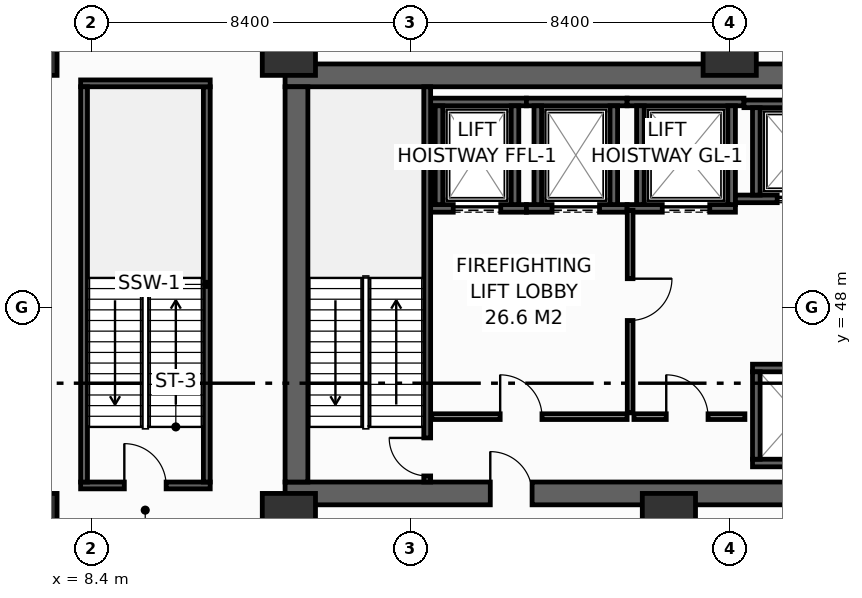
"""IFC4 building model, lengths in metres.
Left out: names, types, materials, properties, quantities, classifications, styles, units other than length and angle.
Written with IfcOpenShell. Run it as: python <this file> out.ifc"""

import sys

from ifc_helpers import new_model, si_unit, direction, frame, frame_2d, origin, origin_2d, place, context, subcontext, project, spatial, rectangle, hollow_rectangle, extrude, element, fill, save


model = new_model("IFC4")
c1 = context("Model", 3, precision=1e-05, world=origin(), true_north=direction((0.0, 1.0)))
c2 = subcontext(c1, "Body", "Model", "MODEL_VIEW")
j1 = project(units=[si_unit("LENGTHUNIT", "METRE"), si_unit("PLANEANGLEUNIT", "RADIAN")], contexts=[c1])
p1 = place(None, origin())
s1 = spatial("IfcSite", under=j1, at=p1, CompositionType="ELEMENT")
p2 = place(p1, origin())
s2 = spatial("IfcBuilding", under=s1, at=p2, CompositionType="ELEMENT")
p3 = place(p2, frame((0.0, 0.0, 11.4)))
s3 = spatial("IfcBuildingStorey", under=s2, at=p3, CompositionType="ELEMENT", Elevation=11.4)
p4 = place(p3, frame((13.5, 43.1, 0.0), z_axis=(0.0, 0.0, 1.0), x_axis=(1.0, 0.0, 0.0)))
e1 = element("IfcWall", 1, at=p4, inside=s3, PredefinedType="SHEAR", context=c2, shape_type="SweptSolid", body=[
    extrude(rectangle(XDim=32.9, YDim=0.6, at=frame_2d((16.45, 0.0))), origin(), (0.0, 0.0, 1.0), 5.1),
])
p5 = place(p4, frame((5.4, 0.0, 0.0)))
e2 = element("IfcOpeningElement", 2, at=p5, cuts=e1, PredefinedType="OPENING", context=c2, shape_type="SweptSolid", body=[
    extrude(rectangle(XDim=1.1, YDim=2.15, at=frame_2d((0.55, 1.075))), frame((0.0, 0.31, 0.0), z_axis=(0.0, -1.0, 0.0), x_axis=(1.0, 0.0, 0.0)), (0.0, 0.0, 1.0), 0.62),
])
p6 = place(p4, frame((25.6, 0.0, 0.0)))
e3 = element("IfcOpeningElement", 3, at=p6, cuts=e1, PredefinedType="OPENING", context=c2, shape_type="SweptSolid", body=[
    extrude(rectangle(XDim=1.1, YDim=2.15, at=frame_2d((0.55, 1.075))), frame((0.0, 0.31, 0.0), z_axis=(0.0, -1.0, 0.0), x_axis=(1.0, 0.0, 0.0)), (0.0, 0.0, 1.0), 0.62),
])
p7 = place(p3, frame((13.5, 54.1, 0.0), z_axis=(0.0, 0.0, 1.0), x_axis=(1.0, 0.0, 0.0)))
e4 = element("IfcWall", 4, at=p7, inside=s3, PredefinedType="SHEAR", context=c2, shape_type="SweptSolid", body=[
    extrude(rectangle(XDim=32.9, YDim=0.6, at=frame_2d((16.45, 0.0))), origin(), (0.0, 0.0, 1.0), 5.1),
])
p8 = place(p3, frame((13.8, 43.4, 0.0), z_axis=(0.0, 0.0, 1.0), x_axis=(0.0, 1.0, 0.0)))
e5 = element("IfcWall", 5, at=p8, inside=s3, PredefinedType="SHEAR", context=c2, shape_type="SweptSolid", body=[
    extrude(rectangle(XDim=10.4, YDim=0.6, at=frame_2d((5.2, 0.0))), origin(), (0.0, 0.0, 1.0), 5.1),
])
for number, where, z_axis, x_axis in (
    (6, (6.8, 54.8, 0.0), (0.0, 0.0, 1.0), (1.0, 0.0, 0.0)),
    (7, (13.6, 54.8, 0.0), (0.0, 0.0, 1.0), (1.0, 0.0, 0.0)),
    (8, (25.2, 54.8, 0.0), (0.0, 0.0, 1.0), (1.0, 0.0, 0.0)),
    (9, (6.8, 42.4, 0.0), (0.0, 0.0, 1.0), (1.0, 0.0, 0.0)),
    (10, (13.6, 42.4, 0.0), (0.0, 0.0, 1.0), (1.0, 0.0, 0.0)),
    (11, (23.6, 42.4, 0.0), (0.0, 0.0, 1.0), (1.0, 0.0, 0.0)),
):
    element("IfcColumn", number, at=place(p3, frame(where, z_axis=z_axis, x_axis=x_axis)), inside=s3, PredefinedType="COLUMN", context=c2, shape_type="SweptSolid", body=[
        extrude(hollow_rectangle(XDim=1.4, YDim=1.4, WallThickness=0.065, at=origin_2d()), origin(), (0.0, 0.0, 1.0), 5.4),
    ])
p9 = place(p3, frame((17.33, 50.6, 0.0), z_axis=(0.0, 0.0, 1.0), x_axis=(1.0, 0.0, 0.0)))
e12 = element("IfcWall", 12, at=p9, inside=s3, PredefinedType="SHEAR", context=c2, shape_type="SweptSolid", body=[
    extrude(rectangle(XDim=2.52, YDim=0.2, at=frame_2d((1.26, 0.0))), origin(), (0.0, 0.0, 1.0), 5.1),
])
p10 = place(p9, frame((0.595, 0.0, 0.0)))
e13 = element("IfcOpeningElement", 13, at=p10, cuts=e12, PredefinedType="OPENING", context=c2, shape_type="SweptSolid", body=[
    extrude(rectangle(XDim=1.25, YDim=2.3, at=frame_2d((0.625, 1.15))), frame((0.0, 0.11, 0.0), z_axis=(0.0, -1.0, 0.0), x_axis=(1.0, 0.0, 0.0)), (0.0, 0.0, 1.0), 0.22),
])
p11 = place(p3, frame((17.33, 53.4, 0.0), z_axis=(0.0, 0.0, 1.0), x_axis=(1.0, 0.0, 0.0)))
e14 = element("IfcWall", 14, at=p11, inside=s3, PredefinedType="SHEAR", context=c2, shape_type="SweptSolid", body=[
    extrude(rectangle(XDim=2.52, YDim=0.2, at=frame_2d((1.26, 0.0))), origin(), (0.0, 0.0, 1.0), 5.1),
])
for number, where, z_axis, x_axis in (
    (15, (17.55, 50.7, 0.0), (0.0, 0.0, 1.0), (0.0, 1.0, 0.0)),
    (16, (19.55, 50.7, 0.0), (0.0, 0.0, 1.0), (0.0, 1.0, 0.0)),
):
    element("IfcWall", number, at=place(p3, frame(where, z_axis=z_axis, x_axis=x_axis)), inside=s3, PredefinedType="SHEAR", context=c2, shape_type="SweptSolid", body=[
        extrude(rectangle(XDim=2.6, YDim=0.2, at=frame_2d((1.3, 0.0))), origin(), (0.0, 0.0, 1.0), 5.1),
    ])
p12 = place(p3, frame((19.85, 50.6, 0.0), z_axis=(0.0, 0.0, 1.0), x_axis=(1.0, 0.0, 0.0)))
e17 = element("IfcWall", 17, at=p12, inside=s3, PredefinedType="SHEAR", context=c2, shape_type="SweptSolid", body=[
    extrude(rectangle(XDim=2.65, YDim=0.2, at=frame_2d((1.325, 0.0))), origin(), (0.0, 0.0, 1.0), 5.1),
])
p13 = place(p12, frame((0.675, 0.0, 0.0)))
e18 = element("IfcOpeningElement", 18, at=p13, cuts=e17, PredefinedType="OPENING", context=c2, shape_type="SweptSolid", body=[
    extrude(rectangle(XDim=1.25, YDim=2.3, at=frame_2d((0.625, 1.15))), frame((0.0, 0.11, 0.0), z_axis=(0.0, -1.0, 0.0), x_axis=(1.0, 0.0, 0.0)), (0.0, 0.0, 1.0), 0.22),
])
p14 = place(p3, frame((19.85, 53.4, 0.0), z_axis=(0.0, 0.0, 1.0), x_axis=(1.0, 0.0, 0.0)))
e19 = element("IfcWall", 19, at=p14, inside=s3, PredefinedType="SHEAR", context=c2, shape_type="SweptSolid", body=[
    extrude(rectangle(XDim=2.65, YDim=0.2, at=frame_2d((1.325, 0.0))), origin(), (0.0, 0.0, 1.0), 5.1),
])
for number, where, z_axis, x_axis in (
    (20, (20.15, 50.7, 0.0), (0.0, 0.0, 1.0), (0.0, 1.0, 0.0)),
    (21, (22.15, 50.7, 0.0), (0.0, 0.0, 1.0), (0.0, 1.0, 0.0)),
):
    element("IfcWall", number, at=place(p3, frame(where, z_axis=z_axis, x_axis=x_axis)), inside=s3, PredefinedType="SHEAR", context=c2, shape_type="SweptSolid", body=[
        extrude(rectangle(XDim=2.6, YDim=0.2, at=frame_2d((1.3, 0.0))), origin(), (0.0, 0.0, 1.0), 5.1),
    ])
p15 = place(p3, frame((22.5, 50.6, 0.0), z_axis=(0.0, 0.0, 1.0), x_axis=(1.0, 0.0, 0.0)))
e22 = element("IfcWall", 22, at=p15, inside=s3, PredefinedType="SHEAR", context=c2, shape_type="SweptSolid", body=[
    extrude(rectangle(XDim=2.85, YDim=0.2, at=frame_2d((1.425, 0.0))), origin(), (0.0, 0.0, 1.0), 5.1),
])
p16 = place(p15, frame((0.925, 0.0, 0.0)))
e23 = element("IfcOpeningElement", 23, at=p16, cuts=e22, PredefinedType="OPENING", context=c2, shape_type="SweptSolid", body=[
    extrude(rectangle(XDim=1.25, YDim=2.3, at=frame_2d((0.625, 1.15))), frame((0.0, 0.11, 0.0), z_axis=(0.0, -1.0, 0.0), x_axis=(1.0, 0.0, 0.0)), (0.0, 0.0, 1.0), 0.22),
])
p17 = place(p3, frame((22.5, 53.4, 0.0), z_axis=(0.0, 0.0, 1.0), x_axis=(1.0, 0.0, 0.0)))
e24 = element("IfcWall", 24, at=p17, inside=s3, PredefinedType="SHEAR", context=c2, shape_type="SweptSolid", body=[
    extrude(rectangle(XDim=3.075, YDim=0.2, at=frame_2d((1.538, 0.0))), origin(), (0.0, 0.0, 1.0), 5.1),
])
for number, where, z_axis, x_axis in (
    (25, (22.85, 50.7, 0.0), (0.0, 0.0, 1.0), (0.0, 1.0, 0.0)),
    (26, (25.25, 50.7, 0.0), (0.0, 0.0, 1.0), (0.0, 1.0, 0.0)),
):
    element("IfcWall", number, at=place(p3, frame(where, z_axis=z_axis, x_axis=x_axis)), inside=s3, PredefinedType="SHEAR", context=c2, shape_type="SweptSolid", body=[
        extrude(rectangle(XDim=2.6, YDim=0.2, at=frame_2d((1.3, 0.0))), origin(), (0.0, 0.0, 1.0), 5.1),
    ])
p18 = place(p3, frame((25.35, 50.85, 0.0), z_axis=(0.0, 0.0, 1.0), x_axis=(1.0, 0.0, 0.0)))
e27 = element("IfcWall", 27, at=p18, inside=s3, PredefinedType="SHEAR", context=c2, shape_type="SweptSolid", body=[
    extrude(rectangle(XDim=3.025, YDim=0.2, at=frame_2d((1.512, 0.0))), origin(), (0.0, 0.0, 1.0), 5.1),
])
p19 = place(p18, frame((1.1, 0.0, 0.0)))
e28 = element("IfcOpeningElement", 28, at=p19, cuts=e27, PredefinedType="OPENING", context=c2, shape_type="SweptSolid", body=[
    extrude(rectangle(XDim=1.1, YDim=2.2, at=frame_2d((0.55, 1.1))), frame((0.0, 0.11, 0.0), z_axis=(0.0, -1.0, 0.0), x_axis=(1.0, 0.0, 0.0)), (0.0, 0.0, 1.0), 0.22),
])
p20 = place(p3, frame((25.575, 53.35, 0.0), z_axis=(0.0, 0.0, 1.0), x_axis=(1.0, 0.0, 0.0)))
e29 = element("IfcWall", 29, at=p20, inside=s3, PredefinedType="SHEAR", context=c2, shape_type="SweptSolid", body=[
    extrude(rectangle(XDim=2.8, YDim=0.2, at=frame_2d((1.4, 0.0))), origin(), (0.0, 0.0, 1.0), 5.1),
])
p21 = place(p3, frame((25.9, 50.95, 0.0), z_axis=(0.0, 0.0, 1.0), x_axis=(0.0, 1.0, 0.0)))
e30 = element("IfcWall", 30, at=p21, inside=s3, PredefinedType="SHEAR", context=c2, shape_type="SweptSolid", body=[
    extrude(rectangle(XDim=2.3, YDim=0.2, at=frame_2d((1.15, 0.0))), origin(), (0.0, 0.0, 1.0), 5.1),
])
for number, where, z_axis, x_axis in (
    (31, (25.8, 43.9, 0.0), (0.0, 0.0, 1.0), (1.0, 0.0, 0.0)),
    (32, (25.8, 46.4, 0.0), (0.0, 0.0, 1.0), (1.0, 0.0, 0.0)),
):
    element("IfcWall", number, at=place(p3, frame(where, z_axis=z_axis, x_axis=x_axis)), inside=s3, PredefinedType="SHEAR", context=c2, shape_type="SweptSolid", body=[
        extrude(rectangle(XDim=2.575, YDim=0.2, at=frame_2d((1.288, 0.0))), origin(), (0.0, 0.0, 1.0), 5.1),
    ])
p22 = place(p3, frame((25.9, 44.0, 0.0), z_axis=(0.0, 0.0, 1.0), x_axis=(0.0, 1.0, 0.0)))
e33 = element("IfcWall", 33, at=p22, inside=s3, PredefinedType="SHEAR", context=c2, shape_type="SweptSolid", body=[
    extrude(rectangle(XDim=2.3, YDim=0.2, at=frame_2d((1.15, 0.0))), origin(), (0.0, 0.0, 1.0), 5.1),
])
p23 = place(p3, frame((17.24, 43.4, 0.0), z_axis=(0.0, 0.0, 1.0), x_axis=(0.0, 1.0, 0.0)))
e34 = element("IfcWall", 34, at=p23, inside=s3, PredefinedType="SHEAR", context=c2, shape_type="SweptSolid", body=[
    extrude(rectangle(XDim=10.4, YDim=0.18, at=frame_2d((5.2, 0.0))), origin(), (0.0, 0.0, 1.0), 5.1),
])
p24 = place(p23, frame((0.16, 0.0, 0.0)))
e35 = element("IfcOpeningElement", 35, at=p24, cuts=e34, PredefinedType="OPENING", context=c2, shape_type="SweptSolid", body=[
    extrude(rectangle(XDim=1.0, YDim=2.15, at=frame_2d((0.5, 1.075))), frame((0.0, 0.1, 0.0), z_axis=(0.0, -1.0, 0.0), x_axis=(1.0, 0.0, 0.0)), (0.0, 0.0, 1.0), 0.2),
])
p25 = place(p3, frame((8.12, 43.31, 0.0), z_axis=(0.0, 0.0, 1.0), x_axis=(1.0, 0.0, 0.0)))
e36 = element("IfcWall", 36, at=p25, inside=s3, PredefinedType="SHEAR", context=c2, shape_type="SweptSolid", body=[
    extrude(rectangle(XDim=3.41, YDim=0.18, at=frame_2d((1.705, 0.0))), origin(), (0.0, 0.0, 1.0), 5.1),
])
p26 = place(p25, frame((1.15, 0.0, 0.0)))
e37 = element("IfcOpeningElement", 37, at=p26, cuts=e36, PredefinedType="OPENING", context=c2, shape_type="SweptSolid", body=[
    extrude(rectangle(XDim=1.1, YDim=2.15, at=frame_2d((0.55, 1.075))), frame((0.0, 0.1, 0.0), z_axis=(0.0, -1.0, 0.0), x_axis=(1.0, 0.0, 0.0)), (0.0, 0.0, 1.0), 0.2),
])
p27 = place(p3, frame((11.44, 43.4, 0.0), z_axis=(0.0, 0.0, 1.0), x_axis=(0.0, 1.0, 0.0)))
e38 = element("IfcWall", 38, at=p27, inside=s3, PredefinedType="SHEAR", context=c2, shape_type="SweptSolid", body=[
    extrude(rectangle(XDim=10.4, YDim=0.18, at=frame_2d((5.2, 0.0))), origin(), (0.0, 0.0, 1.0), 5.1),
])
p28 = place(p3, frame((11.53, 53.89, 0.0), z_axis=(0.0, 0.0, 1.0), x_axis=(-1.0, 0.0, 0.0)))
e39 = element("IfcWall", 39, at=p28, inside=s3, PredefinedType="SHEAR", context=c2, shape_type="SweptSolid", body=[
    extrude(rectangle(XDim=3.41, YDim=0.18, at=frame_2d((1.705, 0.0))), origin(), (0.0, 0.0, 1.0), 5.1),
])
p29 = place(p3, frame((8.21, 53.8, 0.0), z_axis=(0.0, 0.0, 1.0), x_axis=(0.0, -1.0, 0.0)))
e40 = element("IfcWall", 40, at=p29, inside=s3, PredefinedType="SHEAR", context=c2, shape_type="SweptSolid", body=[
    extrude(rectangle(XDim=10.4, YDim=0.18, at=frame_2d((5.2, 0.0))), origin(), (0.0, 0.0, 1.0), 5.1),
])
p30 = place(p3, frame((17.36, 45.12, 0.0), z_axis=(0.0, 0.0, 1.0), x_axis=(1.0, 0.0, 0.0)))
e41 = element("IfcWall", 41, at=p30, inside=s3, PredefinedType="PARTITIONING", context=c2, shape_type="SweptSolid", body=[
    extrude(rectangle(XDim=5.14, YDim=0.15, at=frame_2d((2.57, 0.0))), origin(), (0.0, 0.0, 1.0), 5.1),
])
p31 = place(p30, frame((1.8, 0.0, 0.0)))
e42 = element("IfcOpeningElement", 42, at=p31, cuts=e41, PredefinedType="OPENING", context=c2, shape_type="SweptSolid", body=[
    extrude(rectangle(XDim=1.1, YDim=2.15, at=frame_2d((0.55, 1.075))), frame((0.0, 0.085, 0.0), z_axis=(0.0, -1.0, 0.0), x_axis=(1.0, 0.0, 0.0)), (0.0, 0.0, 1.0), 0.17),
])
p32 = place(p3, frame((22.58, 50.55, 0.0), z_axis=(0.0, 0.0, 1.0), x_axis=(0.0, -1.0, 0.0)))
e43 = element("IfcWall", 43, at=p32, inside=s3, PredefinedType="PARTITIONING", context=c2, shape_type="SweptSolid", body=[
    extrude(rectangle(XDim=5.33, YDim=0.15, at=frame_2d((2.665, 0.0))), origin(), (0.0, 0.0, 1.0), 5.1),
])
p33 = place(p32, frame((1.8, 0.0, 0.0)))
e44 = element("IfcOpeningElement", 44, at=p33, cuts=e43, PredefinedType="OPENING", context=c2, shape_type="SweptSolid", body=[
    extrude(rectangle(XDim=1.1, YDim=2.15, at=frame_2d((0.55, 1.075))), frame((0.0, 0.085, 0.0), z_axis=(0.0, -1.0, 0.0), x_axis=(1.0, 0.0, 0.0)), (0.0, 0.0, 1.0), 0.17),
])
p34 = place(p3, frame((22.68, 45.12, 0.0), z_axis=(0.0, 0.0, 1.0), x_axis=(1.0, 0.0, 0.0)))
e45 = element("IfcWall", 45, at=p34, inside=s3, PredefinedType="PARTITIONING", context=c2, shape_type="SweptSolid", body=[
    extrude(rectangle(XDim=2.92, YDim=0.15, at=frame_2d((1.46, 0.0))), origin(), (0.0, 0.0, 1.0), 5.1),
])
p35 = place(p34, frame((0.85, 0.0, 0.0)))
e46 = element("IfcOpeningElement", 46, at=p35, cuts=e45, PredefinedType="OPENING", context=c2, shape_type="SweptSolid", body=[
    extrude(rectangle(XDim=1.1, YDim=2.15, at=frame_2d((0.55, 1.075))), frame((0.0, 0.085, 0.0), z_axis=(0.0, -1.0, 0.0), x_axis=(1.0, 0.0, 0.0)), (0.0, 0.0, 1.0), 0.17),
])
p36 = place(p10, origin())
e47 = element("IfcDoor", 47, at=p36, inside=s3, OperationType="SLIDING_TO_LEFT", PredefinedType="DOOR", context=c2, shape_type="SweptSolid", body=[
    extrude(rectangle(XDim=1.25, YDim=2.3, at=frame_2d((0.625, 1.15))), frame((0.0, 0.025, 0.0), z_axis=(0.0, -1.0, 0.0), x_axis=(1.0, 0.0, 0.0)), (0.0, 0.0, 1.0), 0.05),
])
fill(e13, e47)
p37 = place(p13, origin())
e48 = element("IfcDoor", 48, at=p37, inside=s3, OperationType="SLIDING_TO_LEFT", PredefinedType="DOOR", context=c2, shape_type="SweptSolid", body=[
    extrude(rectangle(XDim=1.25, YDim=2.3, at=frame_2d((0.625, 1.15))), frame((0.0, 0.025, 0.0), z_axis=(0.0, -1.0, 0.0), x_axis=(1.0, 0.0, 0.0)), (0.0, 0.0, 1.0), 0.05),
])
fill(e18, e48)
p38 = place(p16, origin())
e49 = element("IfcDoor", 49, at=p38, inside=s3, OperationType="SLIDING_TO_LEFT", PredefinedType="DOOR", context=c2, shape_type="SweptSolid", body=[
    extrude(rectangle(XDim=1.25, YDim=2.3, at=frame_2d((0.625, 1.15))), frame((0.0, 0.025, 0.0), z_axis=(0.0, -1.0, 0.0), x_axis=(1.0, 0.0, 0.0)), (0.0, 0.0, 1.0), 0.05),
])
fill(e23, e49)
p39 = place(p19, origin())
e50 = element("IfcDoor", 50, at=p39, inside=s3, OperationType="SLIDING_TO_LEFT", PredefinedType="DOOR", context=c2, shape_type="SweptSolid", body=[
    extrude(rectangle(XDim=1.1, YDim=2.2, at=frame_2d((0.55, 1.1))), frame((0.0, 0.025, 0.0), z_axis=(0.0, -1.0, 0.0), x_axis=(1.0, 0.0, 0.0)), (0.0, 0.0, 1.0), 0.05),
])
fill(e28, e50)
p40 = place(p24, origin())
e51 = element("IfcDoor", 51, at=p40, inside=s3, OperationType="SINGLE_SWING_RIGHT", PredefinedType="DOOR", context=c2, shape_type="SweptSolid", body=[
    extrude(rectangle(XDim=1.0, YDim=2.15, at=frame_2d((0.5, 1.075))), frame((0.0, 0.025, 0.0), z_axis=(0.0, -1.0, 0.0), x_axis=(1.0, 0.0, 0.0)), (0.0, 0.0, 1.0), 0.05),
])
fill(e35, e51)
p41 = place(p26, origin())
e52 = element("IfcDoor", 52, at=p41, inside=s3, OperationType="SINGLE_SWING_LEFT", PredefinedType="DOOR", context=c2, shape_type="SweptSolid", body=[
    extrude(rectangle(XDim=1.1, YDim=2.15, at=frame_2d((0.55, 1.075))), frame((0.0, 0.025, 0.0), z_axis=(0.0, -1.0, 0.0), x_axis=(1.0, 0.0, 0.0)), (0.0, 0.0, 1.0), 0.05),
])
fill(e37, e52)
p42 = place(p31, origin())
e53 = element("IfcDoor", 53, at=p42, inside=s3, OperationType="SINGLE_SWING_LEFT", PredefinedType="DOOR", context=c2, shape_type="SweptSolid", body=[
    extrude(rectangle(XDim=1.1, YDim=2.15, at=frame_2d((0.55, 1.075))), frame((0.0, 0.025, 0.0), z_axis=(0.0, -1.0, 0.0), x_axis=(1.0, 0.0, 0.0)), (0.0, 0.0, 1.0), 0.05),
])
fill(e42, e53)
p43 = place(p33, origin())
e54 = element("IfcDoor", 54, at=p43, inside=s3, OperationType="SINGLE_SWING_LEFT", PredefinedType="DOOR", context=c2, shape_type="SweptSolid", body=[
    extrude(rectangle(XDim=1.1, YDim=2.15, at=frame_2d((0.55, 1.075))), frame((0.0, 0.025, 0.0), z_axis=(0.0, -1.0, 0.0), x_axis=(1.0, 0.0, 0.0)), (0.0, 0.0, 1.0), 0.05),
])
fill(e44, e54)
p44 = place(p35, origin())
e55 = element("IfcDoor", 55, at=p44, inside=s3, OperationType="SINGLE_SWING_LEFT", PredefinedType="DOOR", context=c2, shape_type="SweptSolid", body=[
    extrude(rectangle(XDim=1.1, YDim=2.15, at=frame_2d((0.55, 1.075))), frame((0.0, 0.025, 0.0), z_axis=(0.0, -1.0, 0.0), x_axis=(1.0, 0.0, 0.0)), (0.0, 0.0, 1.0), 0.05),
])
fill(e46, e55)
p45 = place(p5, origin())
e56 = element("IfcDoor", 56, at=p45, inside=s3, OperationType="SINGLE_SWING_LEFT", PredefinedType="DOOR", context=c2, shape_type="SweptSolid", body=[
    extrude(rectangle(XDim=1.1, YDim=2.15, at=frame_2d((0.55, 1.075))), frame((0.0, 0.025, 0.0), z_axis=(0.0, -1.0, 0.0), x_axis=(1.0, 0.0, 0.0)), (0.0, 0.0, 1.0), 0.05),
])
fill(e2, e56)
save(model, sys.argv[1])
